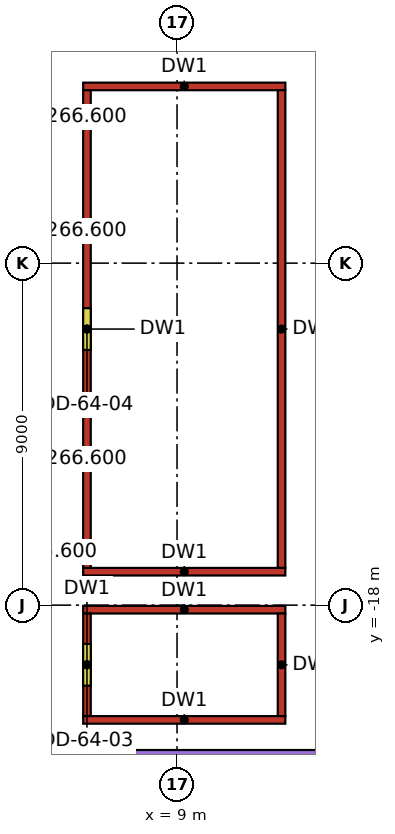
"""IFC4 building model, lengths in metres.
Left out: names, types, materials, properties, quantities, classifications, styles, units other than length and angle.
Written with IfcOpenShell. Run it as: python <this file> out.ifc"""

import sys

from ifc_helpers import new_model, si_unit, direction, frame, frame_2d, origin, place, context, subcontext, project, spatial, rectangle, extrude, element, fill, save


model = new_model("IFC4")
c1 = context("Model", 3, precision=1e-05, world=origin(), true_north=direction((0.0, 1.0)))
c2 = subcontext(c1, "Body", "Model", "MODEL_VIEW")
j1 = project(units=[si_unit("LENGTHUNIT", "METRE"), si_unit("PLANEANGLEUNIT", "RADIAN")], contexts=[c1])
p1 = place(None, origin())
s1 = spatial("IfcSite", under=j1, at=p1, CompositionType="ELEMENT")
p2 = place(p1, origin())
s2 = spatial("IfcBuilding", under=s1, at=p2, CompositionType="ELEMENT")
p3 = place(p2, frame((0.0, 0.0, 266.0)))
s3 = spatial("IfcBuildingStorey", under=s2, at=p3, CompositionType="ELEMENT", Elevation=266.0)
p4 = place(p3, frame((12.409, 10.107, 0.0), z_axis=(0.0, 0.0, 1.0), x_axis=(0.1391723, -0.9902682, 0.0)))
e1 = element("IfcWall", 1, at=p4, inside=s3, PredefinedType="STANDARD", context=c2, shape_type="SweptSolid", body=[
    extrude(rectangle(XDim=28.876, YDim=0.3, at=frame_2d((14.438, 0.0))), origin(), (0.0, 0.0, 1.0), 2.5),
])
p5 = place(p4, frame((10.75, 0.0, 0.0)))
e2 = element("IfcOpeningElement", 2, at=p5, cuts=e1, PredefinedType="OPENING", context=c2, shape_type="SweptSolid", body=[
    extrude(rectangle(XDim=1.8, YDim=2.4, at=frame_2d((0.9, 1.2))), frame((0.0, 0.15, 0.0), z_axis=(0.0, -1.0, 0.0), x_axis=(1.0, 0.0, 0.0)), (0.0, 0.0, 1.0), 0.3),
])
for number, where, z_axis, x_axis in (
    (3, (6.53, -21.02, 0.0), (0.0, 0.0, 1.0), (1.0, 0.0, 0.0)),
    (4, (6.53, -18.12, 0.0), (0.0, 0.0, 1.0), (1.0, 0.0, 0.0)),
):
    element("IfcWall", number, at=place(p3, frame(where, z_axis=z_axis, x_axis=x_axis)), inside=s3, PredefinedType="PARTITIONING", context=c2, shape_type="SweptSolid", body=[
        extrude(rectangle(XDim=5.32, YDim=0.2, at=frame_2d((2.66, 0.0))), origin(), (0.0, 0.0, 1.0), 3.3),
    ])
p6 = place(p3, frame((6.63, -20.92, 0.0), z_axis=(0.0, 0.0, 1.0), x_axis=(0.0, 1.0, 0.0)))
e5 = element("IfcWall", 5, at=p6, inside=s3, PredefinedType="PARTITIONING", context=c2, shape_type="SweptSolid", body=[
    extrude(rectangle(XDim=2.7, YDim=0.2, at=frame_2d((1.35, 0.0))), origin(), (0.0, 0.0, 1.0), 3.3),
])
p7 = place(p6, frame((0.8, 0.0, 0.0)))
e6 = element("IfcOpeningElement", 6, at=p7, cuts=e5, PredefinedType="OPENING", context=c2, shape_type="SweptSolid", body=[
    extrude(rectangle(XDim=1.1, YDim=2.1, at=frame_2d((0.55, 1.05))), frame((0.0, 0.1, 0.0), z_axis=(0.0, -1.0, 0.0), x_axis=(1.0, 0.0, 0.0)), (0.0, 0.0, 1.0), 0.2),
])
p8 = place(p3, frame((11.75, -20.92, 0.0), z_axis=(0.0, 0.0, 1.0), x_axis=(0.0, 1.0, 0.0)))
e7 = element("IfcWall", 7, at=p8, inside=s3, PredefinedType="PARTITIONING", context=c2, shape_type="SweptSolid", body=[
    extrude(rectangle(XDim=2.7, YDim=0.2, at=frame_2d((1.35, 0.0))), origin(), (0.0, 0.0, 1.0), 3.3),
])
for number, where, z_axis, x_axis in (
    (8, (6.53, -17.12, 0.0), (0.0, 0.0, 1.0), (1.0, 0.0, 0.0)),
    (9, (6.53, -4.35, 0.0), (0.0, 0.0, 1.0), (1.0, 0.0, 0.0)),
):
    element("IfcWall", number, at=place(p3, frame(where, z_axis=z_axis, x_axis=x_axis)), inside=s3, PredefinedType="PARTITIONING", context=c2, shape_type="SweptSolid", body=[
        extrude(rectangle(XDim=5.32, YDim=0.2, at=frame_2d((2.66, 0.0))), origin(), (0.0, 0.0, 1.0), 3.3),
    ])
p9 = place(p3, frame((6.63, -17.02, 0.0), z_axis=(0.0, 0.0, 1.0), x_axis=(0.0, 1.0, 0.0)))
e10 = element("IfcWall", 10, at=p9, inside=s3, PredefinedType="PARTITIONING", context=c2, shape_type="SweptSolid", body=[
    extrude(rectangle(XDim=12.57, YDim=0.2, at=frame_2d((6.285, 0.0))), origin(), (0.0, 0.0, 1.0), 3.3),
])
p10 = place(p9, frame((5.735, 0.0, 0.0)))
e11 = element("IfcOpeningElement", 11, at=p10, cuts=e10, PredefinedType="OPENING", context=c2, shape_type="SweptSolid", body=[
    extrude(rectangle(XDim=1.1, YDim=2.1, at=frame_2d((0.55, 1.05))), frame((0.0, 0.1, 0.0), z_axis=(0.0, -1.0, 0.0), x_axis=(1.0, 0.0, 0.0)), (0.0, 0.0, 1.0), 0.2),
])
p11 = place(p3, frame((11.75, -17.02, 0.0), z_axis=(0.0, 0.0, 1.0), x_axis=(0.0, 1.0, 0.0)))
e12 = element("IfcWall", 12, at=p11, inside=s3, PredefinedType="PARTITIONING", context=c2, shape_type="SweptSolid", body=[
    extrude(rectangle(XDim=12.57, YDim=0.2, at=frame_2d((6.285, 0.0))), origin(), (0.0, 0.0, 1.0), 3.3),
])
p12 = place(p7, frame((1.1, 0.0, 0.0), z_axis=(0.0, 0.0, 1.0), x_axis=(-1.0, 0.0, 0.0)))
e13 = element("IfcDoor", 13, at=p12, inside=s3, OperationType="SINGLE_SWING_LEFT", PredefinedType="DOOR", context=c2, shape_type="SweptSolid", body=[
    extrude(rectangle(XDim=1.1, YDim=2.1, at=frame_2d((0.55, 1.05))), frame((0.0, 0.025, 0.0), z_axis=(0.0, -1.0, 0.0), x_axis=(1.0, 0.0, 0.0)), (0.0, 0.0, 1.0), 0.05),
])
fill(e6, e13)
p13 = place(p10, frame((1.1, 0.0, 0.0), z_axis=(0.0, 0.0, 1.0), x_axis=(-1.0, 0.0, 0.0)))
e14 = element("IfcDoor", 14, at=p13, inside=s3, OperationType="SINGLE_SWING_LEFT", PredefinedType="DOOR", context=c2, shape_type="SweptSolid", body=[
    extrude(rectangle(XDim=1.1, YDim=2.1, at=frame_2d((0.55, 1.05))), frame((0.0, 0.025, 0.0), z_axis=(0.0, -1.0, 0.0), x_axis=(1.0, 0.0, 0.0)), (0.0, 0.0, 1.0), 0.05),
])
fill(e11, e14)
save(model, sys.argv[1])
